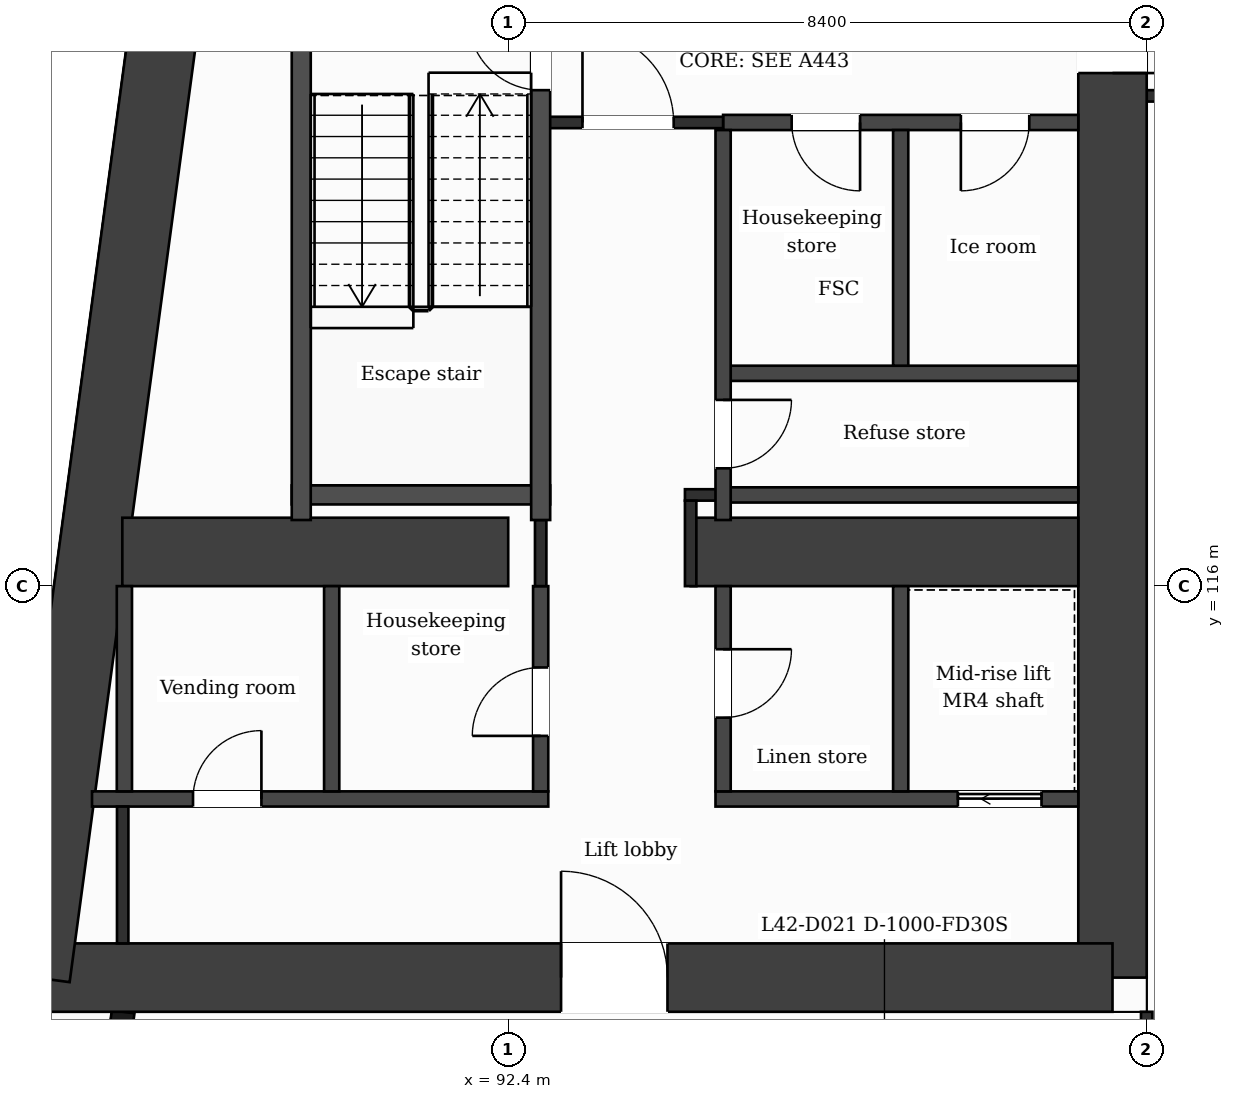
"""IFC4 building model, lengths in metres.
Left out: names, types, materials, properties, quantities, classifications, styles, units other than length and angle.
Written with IfcOpenShell. Run it as: python <this file> out.ifc"""

import sys

from ifc_helpers import new_model, si_unit, direction, frame, frame_2d, origin, place, context, subcontext, project, spatial, rectangle, extrude, element, fill, save


model = new_model("IFC4")
c1 = context("Model", 3, precision=1e-05, world=origin(), true_north=direction((0.0, 1.0)))
c2 = subcontext(c1, "Body", "Model", "MODEL_VIEW")
j1 = project(units=[si_unit("LENGTHUNIT", "METRE"), si_unit("PLANEANGLEUNIT", "RADIAN")], contexts=[c1])
p1 = place(None, origin())
s1 = spatial("IfcSite", under=j1, at=p1, CompositionType="ELEMENT")
p2 = place(p1, origin())
s2 = spatial("IfcBuilding", under=s1, at=p2, CompositionType="ELEMENT")
p3 = place(p2, frame((0.0, 0.0, 177.4)))
s3 = spatial("IfcBuildingStorey", under=s2, at=p3, CompositionType="ELEMENT", Elevation=177.4)
p4 = place(p3, frame((100.35, 131.95, 0.0), z_axis=(0.0, 0.0, 1.0), x_axis=(0.0, -1.0, 0.0)))
e1 = element("IfcWall", 1, at=p4, inside=s3, PredefinedType="SHEAR", context=c2, shape_type="SweptSolid", body=[
    extrude(rectangle(XDim=21.1, YDim=0.9, at=frame_2d((10.55, 0.0))), origin(), (0.0, 0.0, 1.0), 3.7),
])
p5 = place(p4, frame((7.8, 0.0, 0.0)))
e2 = element("IfcOpeningElement", 2, at=p5, cuts=e1, PredefinedType="OPENING", context=c2, shape_type="SweptSolid", body=[
    extrude(rectangle(XDim=1.4, YDim=2.1, at=frame_2d((0.7, 1.05))), frame((0.0, 0.46, 0.0), z_axis=(0.0, -1.0, 0.0), x_axis=(1.0, 0.0, 0.0)), (0.0, 0.0, 1.0), 0.92),
])
p6 = place(p3, frame((100.35, 110.85, 0.0), z_axis=(0.0, 0.0, 1.0), x_axis=(-1.0, 0.0, 0.0)))
e3 = element("IfcWall", 3, at=p6, inside=s3, PredefinedType="SHEAR", context=c2, shape_type="SweptSolid", body=[
    extrude(rectangle(XDim=14.166, YDim=0.9, at=frame_2d((7.083, 0.0))), origin(), (0.0, 0.0, 1.0), 3.7),
])
p7 = place(p6, frame((5.855, 0.0, 0.0)))
e4 = element("IfcOpeningElement", 4, at=p7, cuts=e3, PredefinedType="OPENING", context=c2, shape_type="SweptSolid", body=[
    extrude(rectangle(XDim=1.4, YDim=2.1, at=frame_2d((0.7, 1.05))), frame((0.0, 0.46, 0.0), z_axis=(0.0, -1.0, 0.0), x_axis=(1.0, 0.0, 0.0)), (0.0, 0.0, 1.0), 0.92),
])
p8 = place(p3, frame((86.184, 110.85, 0.0), z_axis=(0.0, 0.0, 1.0), x_axis=(0.133410495943, 0.991060865725, 0.0)))
e5 = element("IfcWall", 5, at=p8, inside=s3, PredefinedType="SHEAR", context=c2, shape_type="SweptSolid", body=[
    extrude(rectangle(XDim=21.29, YDim=0.9, at=frame_2d((10.645, 0.0))), origin(), (0.0, 0.0, 1.0), 3.7),
])
p9 = place(p3, frame((87.323, 116.45, 0.0), z_axis=(0.0, 0.0, 1.0), x_axis=(1.0, 0.0, 0.0)))
e6 = element("IfcWall", 6, at=p9, inside=s3, PredefinedType="SHEAR", context=c2, shape_type="SweptSolid", body=[
    extrude(rectangle(XDim=5.077, YDim=0.9, at=frame_2d((2.539, 0.0))), origin(), (0.0, 0.0, 1.0), 3.7),
])
p10 = place(p3, frame((94.8, 116.45, 0.0), z_axis=(0.0, 0.0, 1.0), x_axis=(1.0, 0.0, 0.0)))
e7 = element("IfcWall", 7, at=p10, inside=s3, PredefinedType="SHEAR", context=c2, shape_type="SweptSolid", body=[
    extrude(rectangle(XDim=5.1, YDim=0.9, at=frame_2d((2.55, 0.0))), origin(), (0.0, 0.0, 1.0), 3.7),
])
p11 = place(p3, frame((87.334, 110.4, 0.0), z_axis=(0.0, 0.0, 1.0), x_axis=(-0.133437175554, -0.991057273915, 0.0)))
e8 = element("IfcWall", 8, at=p11, inside=s3, PredefinedType="SOLIDWALL", context=c2, shape_type="SweptSolid", body=[
    extrude(rectangle(XDim=6.781, YDim=0.3, at=frame_2d((3.39, 0.0))), origin(), (0.0, 0.0, 1.0), 3.38),
])
p12 = place(p11, frame((1.418, 0.0, 0.0)))
e9 = element("IfcOpeningElement", 9, at=p12, cuts=e8, PredefinedType="OPENING", context=c2, shape_type="SweptSolid", body=[
    extrude(rectangle(XDim=1.2, YDim=2.4, at=frame_2d((0.6, 1.2))), frame((0.0, 0.16, 0.0), z_axis=(0.0, -1.0, 0.0), x_axis=(1.0, 0.0, 0.0)), (0.0, 0.0, 1.0), 0.32),
])
p13 = place(p11, frame((4.758, 0.0, 0.9)))
e10 = element("IfcOpeningElement", 10, at=p13, cuts=e8, PredefinedType="OPENING", context=c2, shape_type="SweptSolid", body=[
    extrude(rectangle(XDim=1.2, YDim=2.1, at=frame_2d((0.6, 1.05))), frame((0.0, 0.16, 0.0), z_axis=(0.0, -1.0, 0.0), x_axis=(1.0, 0.0, 0.0)), (0.0, 0.0, 1.0), 0.32),
])
p14 = place(p3, frame((86.924, 113.2, 0.0), z_axis=(0.0, 0.0, 1.0), x_axis=(1.0, 0.0, 0.0)))
e11 = element("IfcWall", 11, at=p14, inside=s3, PredefinedType="PARTITIONING", context=c2, shape_type="SweptSolid", body=[
    extrude(rectangle(XDim=6.003, YDim=0.2, at=frame_2d((3.001, 0.0))), origin(), (0.0, 0.0, 1.0), 3.38),
])
p15 = place(p14, frame((1.329, 0.0, 0.0)))
e12 = element("IfcOpeningElement", 12, at=p15, cuts=e11, PredefinedType="OPENING", context=c2, shape_type="SweptSolid", body=[
    extrude(rectangle(XDim=0.9, YDim=2.1, at=frame_2d((0.45, 1.05))), frame((0.0, 0.11, 0.0), z_axis=(0.0, -1.0, 0.0), x_axis=(1.0, 0.0, 0.0)), (0.0, 0.0, 1.0), 0.22),
])
p16 = place(p3, frame((95.127, 113.2, 0.0), z_axis=(0.0, 0.0, 1.0), x_axis=(1.0, 0.0, 0.0)))
e13 = element("IfcWall", 13, at=p16, inside=s3, PredefinedType="PARTITIONING", context=c2, shape_type="SweptSolid", body=[
    extrude(rectangle(XDim=4.773, YDim=0.2, at=frame_2d((2.386, 0.0))), origin(), (0.0, 0.0, 1.0), 3.38),
])
p17 = place(p16, frame((3.189, 0.0, 0.0)))
e14 = element("IfcOpeningElement", 14, at=p17, cuts=e13, PredefinedType="OPENING", context=c2, shape_type="SweptSolid", body=[
    extrude(rectangle(XDim=1.1, YDim=2.1, at=frame_2d((0.55, 1.05))), frame((0.0, 0.11, 0.0), z_axis=(0.0, -1.0, 0.0), x_axis=(1.0, 0.0, 0.0)), (0.0, 0.0, 1.0), 0.22),
])
p18 = place(p3, frame((95.227, 117.2, 0.0), z_axis=(0.0, 0.0, 1.0), x_axis=(1.0, 0.0, 0.0)))
e15 = element("IfcWall", 15, at=p18, inside=s3, PredefinedType="PARTITIONING", context=c2, shape_type="SweptSolid", body=[
    extrude(rectangle(XDim=4.673, YDim=0.2, at=frame_2d((2.336, 0.0))), origin(), (0.0, 0.0, 1.0), 3.38),
])
p19 = place(p3, frame((94.725, 117.2, 0.0), z_axis=(0.0, 0.0, 1.0), x_axis=(1.0, 0.0, 0.0)))
e16 = element("IfcWall", 16, at=p19, inside=s3, PredefinedType="PARTITIONING", context=c2, shape_type="SweptSolid", body=[
    extrude(rectangle(XDim=0.502, YDim=0.15, at=frame_2d((0.251, 0.0))), origin(), (0.0, 0.0, 1.0), 3.38),
])
p20 = place(p3, frame((89.552, 117.2, 0.0), z_axis=(0.0, 0.0, 1.0), x_axis=(1.0, 0.0, 0.0)))
e17 = element("IfcWall", 17, at=p20, inside=s3, PredefinedType="PARTITIONING", context=c2, shape_type="SweptSolid", body=[
    extrude(rectangle(XDim=3.4, YDim=0.25, at=frame_2d((1.7, 0.0))), origin(), (0.0, 0.0, 1.0), 3.38),
])
p21 = place(p3, frame((95.227, 118.8, 0.0), z_axis=(0.0, 0.0, 1.0), x_axis=(1.0, 0.0, 0.0)))
e18 = element("IfcWall", 18, at=p21, inside=s3, PredefinedType="PARTITIONING", context=c2, shape_type="SweptSolid", body=[
    extrude(rectangle(XDim=4.673, YDim=0.2, at=frame_2d((2.336, 0.0))), origin(), (0.0, 0.0, 1.0), 3.38),
])
p22 = place(p3, frame((95.227, 122.1, 0.0), z_axis=(0.0, 0.0, 1.0), x_axis=(1.0, 0.0, 0.0)))
e19 = element("IfcWall", 19, at=p22, inside=s3, PredefinedType="PARTITIONING", context=c2, shape_type="SweptSolid", body=[
    extrude(rectangle(XDim=4.673, YDim=0.2, at=frame_2d((2.336, 0.0))), origin(), (0.0, 0.0, 1.0), 3.38),
])
p23 = place(p22, frame((0.902, 0.0, 0.0)))
e20 = element("IfcOpeningElement", 20, at=p23, cuts=e19, PredefinedType="OPENING", context=c2, shape_type="SweptSolid", body=[
    extrude(rectangle(XDim=0.9, YDim=2.1, at=frame_2d((0.45, 1.05))), frame((0.0, 0.11, 0.0), z_axis=(0.0, -1.0, 0.0), x_axis=(1.0, 0.0, 0.0)), (0.0, 0.0, 1.0), 0.22),
])
p24 = place(p22, frame((3.128, 0.0, 0.0)))
e21 = element("IfcOpeningElement", 21, at=p24, cuts=e19, PredefinedType="OPENING", context=c2, shape_type="SweptSolid", body=[
    extrude(rectangle(XDim=0.9, YDim=2.1, at=frame_2d((0.45, 1.05))), frame((0.0, 0.11, 0.0), z_axis=(0.0, -1.0, 0.0), x_axis=(1.0, 0.0, 0.0)), (0.0, 0.0, 1.0), 0.22),
])
p25 = place(p3, frame((92.827, 122.1, 0.0), z_axis=(0.0, 0.0, 1.0), x_axis=(1.0, 0.0, 0.0)))
e22 = element("IfcWall", 22, at=p25, inside=s3, PredefinedType="PARTITIONING", context=c2, shape_type="SweptSolid", body=[
    extrude(rectangle(XDim=2.4, YDim=0.15, at=frame_2d((1.2, 0.0))), origin(), (0.0, 0.0, 1.0), 3.38),
])
p26 = place(p25, frame((0.55, 0.0, 0.0)))
e23 = element("IfcOpeningElement", 23, at=p26, cuts=e22, PredefinedType="OPENING", context=c2, shape_type="SweptSolid", body=[
    extrude(rectangle(XDim=1.2, YDim=2.1, at=frame_2d((0.6, 1.05))), frame((0.0, 0.085, 0.0), z_axis=(0.0, -1.0, 0.0), x_axis=(1.0, 0.0, 0.0)), (0.0, 0.0, 1.0), 0.17),
])
p27 = place(p3, frame((100.8, 122.45, 0.0), z_axis=(0.0, 0.0, 1.0), x_axis=(1.0, 0.0, 0.0)))
e24 = element("IfcWall", 24, at=p27, inside=s3, PredefinedType="PARTITIONING", context=c2, shape_type="SweptSolid", body=[
    extrude(rectangle(XDim=25.2, YDim=0.15, at=frame_2d((12.6, 0.0))), origin(), (0.0, 0.0, 1.0), 3.38),
])
p28 = place(p3, frame((87.35, 113.3, 0.0), z_axis=(0.0, 0.0, 1.0), x_axis=(0.0, 1.0, 0.0)))
e25 = element("IfcWall", 25, at=p28, inside=s3, PredefinedType="PARTITIONING", context=c2, shape_type="SweptSolid", body=[
    extrude(rectangle(XDim=2.7, YDim=0.2, at=frame_2d((1.35, 0.0))), origin(), (0.0, 0.0, 1.0), 3.38),
])
p29 = place(p3, frame((87.328, 111.3, 0.0), z_axis=(0.0, 0.0, 1.0), x_axis=(0.0, 1.0, 0.0)))
e26 = element("IfcWall", 26, at=p29, inside=s3, PredefinedType="PARTITIONING", context=c2, shape_type="SweptSolid", body=[
    extrude(rectangle(XDim=1.8, YDim=0.15, at=frame_2d((0.9, 0.0))), origin(), (0.0, 0.0, 1.0), 3.38),
])
p30 = place(p3, frame((89.677, 116.87, 0.0), z_axis=(0.0, 0.0, 1.0), x_axis=(0.0, 1.0, 0.0)))
e27 = element("IfcWall", 27, at=p30, inside=s3, PredefinedType="PARTITIONING", context=c2, shape_type="SweptSolid", body=[
    extrude(rectangle(XDim=6.955, YDim=0.25, at=frame_2d((3.478, 0.0))), origin(), (0.0, 0.0, 1.0), 3.38),
])
p31 = place(p3, frame((90.077, 113.3, 0.0), z_axis=(0.0, 0.0, 1.0), x_axis=(0.0, 1.0, 0.0)))
e28 = element("IfcWall", 28, at=p31, inside=s3, PredefinedType="PARTITIONING", context=c2, shape_type="SweptSolid", body=[
    extrude(rectangle(XDim=2.7, YDim=0.2, at=frame_2d((1.35, 0.0))), origin(), (0.0, 0.0, 1.0), 3.38),
])
p32 = place(p3, frame((92.827, 113.3, 0.0), z_axis=(0.0, 0.0, 1.0), x_axis=(0.0, 1.0, 0.0)))
e29 = element("IfcWall", 29, at=p32, inside=s3, PredefinedType="PARTITIONING", context=c2, shape_type="SweptSolid", body=[
    extrude(rectangle(XDim=2.7, YDim=0.2, at=frame_2d((1.35, 0.0))), origin(), (0.0, 0.0, 1.0), 3.38),
])
p33 = place(p32, frame((0.73, 0.0, 0.0)))
e30 = element("IfcOpeningElement", 30, at=p33, cuts=e29, PredefinedType="OPENING", context=c2, shape_type="SweptSolid", body=[
    extrude(rectangle(XDim=0.9, YDim=2.1, at=frame_2d((0.45, 1.05))), frame((0.0, 0.11, 0.0), z_axis=(0.0, -1.0, 0.0), x_axis=(1.0, 0.0, 0.0)), (0.0, 0.0, 1.0), 0.22),
])
p34 = place(p3, frame((92.827, 116.0, 0.0), z_axis=(0.0, 0.0, 1.0), x_axis=(0.0, 1.0, 0.0)))
e31 = element("IfcWall", 31, at=p34, inside=s3, PredefinedType="PARTITIONING", context=c2, shape_type="SweptSolid", body=[
    extrude(rectangle(XDim=0.87, YDim=0.15, at=frame_2d((0.435, 0.0))), origin(), (0.0, 0.0, 1.0), 3.38),
])
p35 = place(p3, frame((92.827, 116.87, 0.0), z_axis=(0.0, 0.0, 1.0), x_axis=(0.0, 1.0, 0.0)))
e32 = element("IfcWall", 32, at=p35, inside=s3, PredefinedType="PARTITIONING", context=c2, shape_type="SweptSolid", body=[
    extrude(rectangle(XDim=6.955, YDim=0.25, at=frame_2d((3.478, 0.0))), origin(), (0.0, 0.0, 1.0), 3.38),
])
p36 = place(p35, frame((5.655, 0.0, 0.0)))
e33 = element("IfcOpeningElement", 33, at=p36, cuts=e32, PredefinedType="OPENING", context=c2, shape_type="SweptSolid", body=[
    extrude(rectangle(XDim=0.95, YDim=2.1, at=frame_2d((0.475, 1.05))), frame((0.0, 0.135, 0.0), z_axis=(0.0, -1.0, 0.0), x_axis=(1.0, 0.0, 0.0)), (0.0, 0.0, 1.0), 0.27),
])
p37 = place(p3, frame((94.8, 116.0, 0.0), z_axis=(0.0, 0.0, 1.0), x_axis=(0.0, 1.0, 0.0)))
e34 = element("IfcWall", 34, at=p37, inside=s3, PredefinedType="PARTITIONING", context=c2, shape_type="SweptSolid", body=[
    extrude(rectangle(XDim=1.125, YDim=0.15, at=frame_2d((0.562, 0.0))), origin(), (0.0, 0.0, 1.0), 3.38),
])
p38 = place(p3, frame((95.227, 113.3, 0.0), z_axis=(0.0, 0.0, 1.0), x_axis=(0.0, 1.0, 0.0)))
e35 = element("IfcWall", 35, at=p38, inside=s3, PredefinedType="PARTITIONING", context=c2, shape_type="SweptSolid", body=[
    extrude(rectangle(XDim=2.7, YDim=0.2, at=frame_2d((1.35, 0.0))), origin(), (0.0, 0.0, 1.0), 3.38),
])
p39 = place(p38, frame((0.97, 0.0, 0.0)))
e36 = element("IfcOpeningElement", 36, at=p39, cuts=e35, PredefinedType="OPENING", context=c2, shape_type="SweptSolid", body=[
    extrude(rectangle(XDim=0.9, YDim=2.1, at=frame_2d((0.45, 1.05))), frame((0.0, 0.11, 0.0), z_axis=(0.0, -1.0, 0.0), x_axis=(1.0, 0.0, 0.0)), (0.0, 0.0, 1.0), 0.22),
])
p40 = place(p3, frame((95.227, 116.87, 0.0), z_axis=(0.0, 0.0, 1.0), x_axis=(0.0, 1.0, 0.0)))
e37 = element("IfcWall", 37, at=p40, inside=s3, PredefinedType="PARTITIONING", context=c2, shape_type="SweptSolid", body=[
    extrude(rectangle(XDim=5.13, YDim=0.2, at=frame_2d((2.565, 0.0))), origin(), (0.0, 0.0, 1.0), 3.38),
])
p41 = place(p40, frame((0.68, 0.0, 0.0)))
e38 = element("IfcOpeningElement", 38, at=p41, cuts=e37, PredefinedType="OPENING", context=c2, shape_type="SweptSolid", body=[
    extrude(rectangle(XDim=0.9, YDim=2.1, at=frame_2d((0.45, 1.05))), frame((0.0, 0.11, 0.0), z_axis=(0.0, -1.0, 0.0), x_axis=(1.0, 0.0, 0.0)), (0.0, 0.0, 1.0), 0.22),
])
p42 = place(p3, frame((97.563, 113.3, 0.0), z_axis=(0.0, 0.0, 1.0), x_axis=(0.0, 1.0, 0.0)))
e39 = element("IfcWall", 39, at=p42, inside=s3, PredefinedType="PARTITIONING", context=c2, shape_type="SweptSolid", body=[
    extrude(rectangle(XDim=2.7, YDim=0.2, at=frame_2d((1.35, 0.0))), origin(), (0.0, 0.0, 1.0), 3.38),
])
p43 = place(p3, frame((97.563, 118.9, 0.0), z_axis=(0.0, 0.0, 1.0), x_axis=(0.0, 1.0, 0.0)))
e40 = element("IfcWall", 40, at=p43, inside=s3, PredefinedType="PARTITIONING", context=c2, shape_type="SweptSolid", body=[
    extrude(rectangle(XDim=3.1, YDim=0.2, at=frame_2d((1.55, 0.0))), origin(), (0.0, 0.0, 1.0), 3.38),
])
p44 = place(p3, frame((100.8, 109.075, 0.0), z_axis=(0.0, 0.0, 1.0), x_axis=(0.0, 1.0, 0.0)))
e41 = element("IfcWall", 41, at=p44, inside=s3, PredefinedType="PARTITIONING", context=c2, shape_type="SweptSolid", body=[
    extrude(rectangle(XDim=1.325, YDim=0.15, at=frame_2d((0.663, 0.0))), origin(), (0.0, 0.0, 1.0), 3.38),
])
p45 = place(p26, origin())
e42 = element("IfcDoor", 42, at=p45, inside=s3, OperationType="SINGLE_SWING_LEFT", PredefinedType="DOOR", context=c2, shape_type="SweptSolid", body=[
    extrude(rectangle(XDim=1.2, YDim=2.1, at=frame_2d((0.6, 1.05))), frame((0.0, 0.025, 0.0), z_axis=(0.0, -1.0, 0.0), x_axis=(1.0, 0.0, 0.0)), (0.0, 0.0, 1.0), 0.05),
])
fill(e23, e42)
p46 = place(p23, origin())
e43 = element("IfcDoor", 43, at=p46, inside=s3, OperationType="SINGLE_SWING_RIGHT", PredefinedType="DOOR", context=c2, shape_type="SweptSolid", body=[
    extrude(rectangle(XDim=0.9, YDim=2.1, at=frame_2d((0.45, 1.05))), frame((0.0, 0.025, 0.0), z_axis=(0.0, -1.0, 0.0), x_axis=(1.0, 0.0, 0.0)), (0.0, 0.0, 1.0), 0.05),
])
fill(e20, e43)
p47 = place(p24, origin())
e44 = element("IfcDoor", 44, at=p47, inside=s3, OperationType="SINGLE_SWING_LEFT", PredefinedType="DOOR", context=c2, shape_type="SweptSolid", body=[
    extrude(rectangle(XDim=0.9, YDim=2.1, at=frame_2d((0.45, 1.05))), frame((0.0, 0.025, 0.0), z_axis=(0.0, -1.0, 0.0), x_axis=(1.0, 0.0, 0.0)), (0.0, 0.0, 1.0), 0.05),
])
fill(e21, e44)
p48 = place(p36, origin())
e45 = element("IfcDoor", 45, at=p48, inside=s3, OperationType="SINGLE_SWING_RIGHT", PredefinedType="DOOR", context=c2, shape_type="SweptSolid", body=[
    extrude(rectangle(XDim=0.95, YDim=2.1, at=frame_2d((0.475, 1.05))), frame((0.0, 0.025, 0.0), z_axis=(0.0, -1.0, 0.0), x_axis=(1.0, 0.0, 0.0)), (0.0, 0.0, 1.0), 0.05),
])
fill(e33, e45)
p49 = place(p41, origin())
e46 = element("IfcDoor", 46, at=p49, inside=s3, OperationType="SINGLE_SWING_RIGHT", PredefinedType="DOOR", context=c2, shape_type="SweptSolid", body=[
    extrude(rectangle(XDim=0.9, YDim=2.1, at=frame_2d((0.45, 1.05))), frame((0.0, 0.025, 0.0), z_axis=(0.0, -1.0, 0.0), x_axis=(1.0, 0.0, 0.0)), (0.0, 0.0, 1.0), 0.05),
])
fill(e38, e46)
p50 = place(p17, origin())
e47 = element("IfcDoor", 47, at=p50, inside=s3, OperationType="SLIDING_TO_LEFT", PredefinedType="DOOR", context=c2, shape_type="SweptSolid", body=[
    extrude(rectangle(XDim=1.1, YDim=2.1, at=frame_2d((0.55, 1.05))), frame((0.0, 0.025, 0.0), z_axis=(0.0, -1.0, 0.0), x_axis=(1.0, 0.0, 0.0)), (0.0, 0.0, 1.0), 0.05),
])
fill(e14, e47)
p51 = place(p15, origin())
e48 = element("IfcDoor", 48, at=p51, inside=s3, OperationType="SINGLE_SWING_RIGHT", PredefinedType="DOOR", context=c2, shape_type="SweptSolid", body=[
    extrude(rectangle(XDim=0.9, YDim=2.1, at=frame_2d((0.45, 1.05))), frame((0.0, 0.025, 0.0), z_axis=(0.0, -1.0, 0.0), x_axis=(1.0, 0.0, 0.0)), (0.0, 0.0, 1.0), 0.05),
])
fill(e12, e48)
p52 = place(p33, origin())
e49 = element("IfcDoor", 49, at=p52, inside=s3, OperationType="SINGLE_SWING_LEFT", PredefinedType="DOOR", context=c2, shape_type="SweptSolid", body=[
    extrude(rectangle(XDim=0.9, YDim=2.1, at=frame_2d((0.45, 1.05))), frame((0.0, 0.025, 0.0), z_axis=(0.0, -1.0, 0.0), x_axis=(1.0, 0.0, 0.0)), (0.0, 0.0, 1.0), 0.05),
])
fill(e30, e49)
p53 = place(p39, origin())
e50 = element("IfcDoor", 50, at=p53, inside=s3, OperationType="SINGLE_SWING_RIGHT", PredefinedType="DOOR", context=c2, shape_type="SweptSolid", body=[
    extrude(rectangle(XDim=0.9, YDim=2.1, at=frame_2d((0.45, 1.05))), frame((0.0, 0.025, 0.0), z_axis=(0.0, -1.0, 0.0), x_axis=(1.0, 0.0, 0.0)), (0.0, 0.0, 1.0), 0.05),
])
fill(e36, e50)
p54 = place(p7, origin())
e51 = element("IfcDoor", 51, at=p54, inside=s3, OperationType="SINGLE_SWING_RIGHT", PredefinedType="DOOR", context=c2, shape_type="SweptSolid", body=[
    extrude(rectangle(XDim=1.4, YDim=2.1, at=frame_2d((0.7, 1.05))), frame((0.0, 0.025, 0.0), z_axis=(0.0, -1.0, 0.0), x_axis=(1.0, 0.0, 0.0)), (0.0, 0.0, 1.0), 0.05),
])
fill(e4, e51)
p55 = place(p5, origin())
e52 = element("IfcDoor", 52, at=p55, inside=s3, OperationType="SINGLE_SWING_RIGHT", PredefinedType="DOOR", context=c2, shape_type="SweptSolid", body=[
    extrude(rectangle(XDim=1.4, YDim=2.1, at=frame_2d((0.7, 1.05))), frame((0.0, 0.025, 0.0), z_axis=(0.0, -1.0, 0.0), x_axis=(1.0, 0.0, 0.0)), (0.0, 0.0, 1.0), 0.05),
])
fill(e2, e52)
save(model, sys.argv[1])
